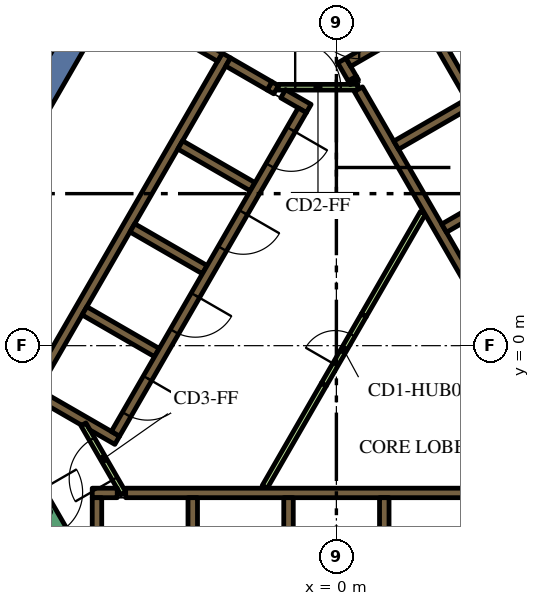
"""IFC4 building model, lengths in metres.
Left out: names, types, materials, properties, quantities, classifications, styles, units other than length and angle.
Written with IfcOpenShell. Run it as: python <this file> out.ifc"""

import sys

from ifc_helpers import new_model, si_unit, direction, frame, frame_2d, origin, place, context, subcontext, project, spatial, polyline, rectangle, outline, extrude, element, fill, save


model = new_model("IFC4")
c1 = context("Model", 3, precision=1e-05, world=origin(), true_north=direction((0.0, 1.0)))
c2 = subcontext(c1, "Body", "Model", "MODEL_VIEW")
j1 = project(units=[si_unit("LENGTHUNIT", "METRE"), si_unit("PLANEANGLEUNIT", "RADIAN")], contexts=[c1])
p1 = place(None, origin())
s1 = spatial("IfcSite", under=j1, at=p1, CompositionType="ELEMENT")
p2 = place(p1, origin())
s2 = spatial("IfcBuilding", under=s1, at=p2, CompositionType="ELEMENT")
p3 = place(p2, frame((0.0, 0.0, 239.4)))
s3 = spatial("IfcBuildingStorey", under=s2, at=p3, CompositionType="ELEMENT", Elevation=239.4)
p4 = place(p3, frame((8.235, 5.736, 0.0), z_axis=(0.0, 0.0, 1.0), x_axis=(-0.499983401189, 0.8660349869, 0.0)))
e1 = element("IfcWall", 1, at=p4, inside=s3, PredefinedType="SOLIDWALL", context=c2, shape_type="SweptSolid", body=[
    extrude(rectangle(XDim=12.472, YDim=0.7, at=frame_2d((6.236, 0.0))), origin(), (0.0, 0.0, 1.0), 4.2),
])
p5 = place(p3, frame((-12.625, -1.867, 0.0), z_axis=(0.0, 0.0, 1.0), x_axis=(0.500008520515, 0.866020484407, 0.0)))
e2 = element("IfcWall", 2, at=p5, inside=s3, PredefinedType="SOLIDWALL", context=c2, shape_type="SweptSolid", body=[
    extrude(rectangle(XDim=15.859, YDim=0.7, at=frame_2d((7.929, 0.0))), origin(), (0.0, 0.0, 1.0), 4.2),
])
p6 = place(p3, frame((-5.545, -3.875, 0.0), z_axis=(0.0, 0.0, 1.0), x_axis=(1.0, 0.0, 0.0)))
e3 = element("IfcWall", 3, at=p6, inside=s3, PredefinedType="SOLIDWALL", context=c2, shape_type="SweptSolid", body=[
    extrude(rectangle(XDim=11.97, YDim=0.25, at=frame_2d((5.985, 0.0))), origin(), (0.0, 0.0, 1.0), 4.2),
])
p7 = place(p3, frame((-6.425, -3.875, 0.0), z_axis=(0.0, 0.0, 1.0), x_axis=(1.0, 0.0, 0.0)))
e4 = element("IfcWall", 4, at=p7, inside=s3, PredefinedType="SOLIDWALL", context=c2, shape_type="SweptSolid", body=[
    extrude(rectangle(XDim=0.658, YDim=0.25, at=frame_2d((0.329, 0.0))), origin(), (0.0, 0.0, 1.0), 4.2),
])
for number, where, z_axis, x_axis in (
    (5, (1.26, -4.0, 0.0), (0.0, 0.0, 1.0), (0.0, -1.0, 0.0)),
    (6, (-1.26, -4.0, 0.0), (0.0, 0.0, 1.0), (0.0, -1.0, 0.0)),
    (7, (-3.78, -4.0, 0.0), (0.0, 0.0, 1.0), (0.0, -1.0, 0.0)),
):
    element("IfcWall", number, at=place(p3, frame(where, z_axis=z_axis, x_axis=x_axis)), inside=s3, PredefinedType="SOLIDWALL", context=c2, shape_type="SweptSolid", body=[
        extrude(rectangle(XDim=2.2, YDim=0.25, at=frame_2d((1.1, 0.0))), origin(), (0.0, 0.0, 1.0), 4.2),
    ])
p8 = place(p3, frame((-6.3, -7.125, 0.0), z_axis=(0.0, 0.0, 1.0), x_axis=(0.0, 1.0, 0.0)))
e8 = element("IfcWall", 8, at=p8, inside=s3, PredefinedType="SOLIDWALL", context=c2, shape_type="SweptSolid", body=[
    extrude(rectangle(XDim=3.125, YDim=0.25, at=frame_2d((1.562, 0.0))), origin(), (0.0, 0.0, 1.0), 4.2),
])
p9 = place(p3, frame((0.473, 6.93, 0.0), z_axis=(0.0, 0.0, 1.0), x_axis=(-0.49972245349, 0.866185586049, 0.0)))
e9 = element("IfcWall", 9, at=p9, inside=s3, PredefinedType="SOLIDWALL", context=c2, shape_type="SweptSolid", body=[
    extrude(rectangle(XDim=0.11, YDim=0.25, at=frame_2d((0.055, 0.0))), origin(), (0.0, 0.0, 1.0), 4.2),
])
p10 = place(p3, frame((6.568, -3.627, 0.0), z_axis=(0.0, 0.0, 1.0), x_axis=(-0.499999455981, 0.866025717874, 0.0)))
e10 = element("IfcWall", 10, at=p10, inside=s3, PredefinedType="SOLIDWALL", context=c2, shape_type="SweptSolid", body=[
    extrude(rectangle(XDim=11.978, YDim=0.25, at=frame_2d((5.989, 0.0))), origin(), (0.0, 0.0, 1.0), 4.2),
])
p11 = place(p3, frame((0.417, 7.027, 0.0), z_axis=(0.0, 0.0, 1.0), x_axis=(-0.500210807569, 0.865903659763, 0.0)))
e11 = element("IfcWall", 11, at=p11, inside=s3, PredefinedType="SOLIDWALL", context=c2, shape_type="SweptSolid", body=[
    extrude(rectangle(XDim=0.548, YDim=0.25, at=frame_2d((0.274, 0.0))), origin(), (0.0, 0.0, 1.0), 4.2),
])
p12 = place(p3, frame((3.1, 9.064, 0.0), z_axis=(0.0, 0.0, 1.0), x_axis=(-0.866030133475, -0.499991807846, 0.0)))
e12 = element("IfcWall", 12, at=p12, inside=s3, PredefinedType="SOLIDWALL", context=c2, shape_type="SweptSolid", body=[
    extrude(rectangle(XDim=3.217, YDim=0.25, at=frame_2d((1.608, 0.0))), origin(), (0.0, 0.0, 1.0), 4.2),
])
p13 = place(p3, frame((1.574, 5.274, 0.0), z_axis=(0.0, 0.0, 1.0), x_axis=(0.866028486751, 0.499994660107, 0.0)))
e13 = element("IfcWall", 13, at=p13, inside=s3, PredefinedType="SOLIDWALL", context=c2, shape_type="SweptSolid", body=[
    extrude(rectangle(XDim=2.2, YDim=0.25, at=frame_2d((1.1, 0.0))), origin(), (0.0, 0.0, 1.0), 4.2),
])
p14 = place(p3, frame((2.834, 3.091, 0.0), z_axis=(0.0, 0.0, 1.0), x_axis=(0.866008176907, 0.50002983664, 0.0)))
e14 = element("IfcWall", 14, at=p14, inside=s3, PredefinedType="SOLIDWALL", context=c2, shape_type="SweptSolid", body=[
    extrude(rectangle(XDim=2.2, YDim=0.25, at=frame_2d((1.1, 0.0))), origin(), (0.0, 0.0, 1.0), 4.2),
])
p15 = place(p3, frame((-8.06, -1.311, 0.0), z_axis=(0.0, 0.0, 1.0), x_axis=(0.50000273126, 0.866023826885, 0.0)))
e15 = element("IfcWall", 15, at=p15, inside=s3, PredefinedType="SOLIDWALL", context=c2, shape_type="SweptSolid", body=[
    extrude(rectangle(XDim=10.33, YDim=0.25, at=frame_2d((5.165, 0.0))), origin(), (0.0, 0.0, 1.0), 4.2),
])
p16 = place(p3, frame((-1.758, 6.835, 0.0), z_axis=(0.0, 0.0, 1.0), x_axis=(0.865982457891, -0.500074377092, 0.0)))
e16 = element("IfcWall", 16, at=p16, inside=s3, PredefinedType="SOLIDWALL", context=c2, shape_type="SweptSolid", body=[
    extrude(rectangle(XDim=0.2, YDim=0.25, at=frame_2d((0.1, 0.0))), origin(), (0.0, 0.0, 1.0), 4.2),
])
p17 = place(p3, frame((-1.76, 6.836, 0.0), z_axis=(0.0, 0.0, 1.0), x_axis=(-0.865952863304, 0.500125622755, 0.0)))
e17 = element("IfcWall", 17, at=p17, inside=s3, PredefinedType="SOLIDWALL", context=c2, shape_type="SweptSolid", body=[
    extrude(rectangle(XDim=1.258, YDim=0.25, at=frame_2d((0.629, 0.0))), origin(), (0.0, 0.0, 1.0), 4.2),
])
p18 = place(p3, frame((-0.728, 6.24, 0.0), z_axis=(0.0, 0.0, 1.0), x_axis=(-0.865955664968, 0.500120771724, 0.0)))
e18 = element("IfcWall", 18, at=p18, inside=s3, PredefinedType="SOLIDWALL", context=c2, shape_type="SweptSolid", body=[
    extrude(rectangle(XDim=0.778, YDim=0.25, at=frame_2d((0.389, 0.0))), origin(), (0.0, 0.0, 1.0), 4.2),
])
for number, where, z_axis, x_axis in (
    (19, (-2.204, 4.182, 0.0), (0.0, 0.0, 1.0), (-0.866, 0.5, 0.0)),
    (20, (-5.369, 3.1, 0.0), (0.0, 0.0, 1.0), (0.866, -0.5, 0.0)),
    (21, (-4.724, -0.182, 0.0), (0.0, 0.0, 1.0), (-0.866, 0.5, 0.0)),
):
    element("IfcWall", number, at=place(p3, frame(where, z_axis=z_axis, x_axis=x_axis)), inside=s3, PredefinedType="SOLIDWALL", context=c2, shape_type="SweptSolid", body=[
        extrude(rectangle(XDim=2.2, YDim=0.25, at=frame_2d((1.1, 0.0))), origin(), (0.0, 0.0, 1.0), 4.2),
    ])
p19 = place(p3, origin())
e22 = element("IfcWall", 22, at=p19, inside=s3, PredefinedType="SOLIDWALL", context=c2, shape_type="SweptSolid", body=[
    extrude(outline(polyline([(-5.922, -2.257), (-5.922, -2.257), (-5.705, -2.382), (-5.83, -2.598), (-6.483, -2.221), (-6.591, -2.033), (-6.591, -2.033), (-6.7, -2.096), (-7.952, -1.373), (-7.827, -1.156), (-5.922, -2.257)])), origin(), (0.0, 0.0, 1.0), 4.2),
])
p20 = place(p3, frame((-3.066, 7.59, 0.0), z_axis=(0.0, 0.0, 1.0), x_axis=(-0.866081358704, 0.49990307071, 0.0)))
e23 = element("IfcWall", 23, at=p20, inside=s3, PredefinedType="SOLIDWALL", context=c2, shape_type="SweptSolid", body=[
    extrude(rectangle(XDim=0.858, YDim=0.25, at=frame_2d((0.429, 0.0))), origin(), (0.0, 0.0, 1.0), 4.2),
])
p21 = place(p3, frame((-1.887, -3.718, 0.0), z_axis=(0.0, 0.0, 1.0), x_axis=(0.500043732237, 0.866000153493, 0.0)))
e24 = element("IfcWall", 24, at=p21, inside=s3, PredefinedType="PARTITIONING", context=c2, shape_type="SweptSolid", body=[
    extrude(rectangle(XDim=3.114, YDim=0.15, at=frame_2d((1.557, 0.0))), origin(), (0.0, 0.0, 1.0), 3.45),
])
p22 = place(p3, frame((0.72, 0.797, 0.0), z_axis=(0.0, 0.0, 1.0), x_axis=(0.499984921984, 0.866034108906, 0.0)))
e25 = element("IfcWall", 25, at=p22, inside=s3, PredefinedType="PARTITIONING", context=c2, shape_type="SweptSolid", body=[
    extrude(rectangle(XDim=3.113, YDim=0.15, at=frame_2d((1.557, 0.0))), origin(), (0.0, 0.0, 1.0), 3.45),
])
p23 = place(p3, frame((8.565, -2.185, 0.0), z_axis=(0.0, 0.0, 1.0), x_axis=(-0.499997954832, 0.866026584559, 0.0)))
e26 = element("IfcWall", 26, at=p23, inside=s3, PredefinedType="SOLIDWALL", context=c2, shape_type="SweptSolid", body=[
    extrude(rectangle(XDim=12.35, YDim=0.25, at=frame_2d((6.175, 0.0))), origin(), (0.0, 0.0, 1.0), 4.2),
])
p24 = place(p23, frame((0.585, 0.0, 0.0)))
e27 = element("IfcOpeningElement", 27, at=p24, cuts=e26, PredefinedType="OPENING", context=c2, shape_type="SweptSolid", body=[
    extrude(rectangle(XDim=1.1, YDim=2.1, at=frame_2d((0.55, 1.05))), frame((0.0, 0.135, 0.0), z_axis=(0.0, -1.0, 0.0), x_axis=(1.0, 0.0, 0.0)), (0.0, 0.0, 1.0), 0.27),
])
p25 = place(p3, frame((-0.898, 6.194, 0.0), z_axis=(0.0, 0.0, 1.0), x_axis=(-0.499996202215, -0.866027596426, 0.0)))
e28 = element("IfcWall", 28, at=p25, inside=s3, PredefinedType="SOLIDWALL", context=c2, shape_type="SweptSolid", body=[
    extrude(rectangle(XDim=9.83, YDim=0.25, at=frame_2d((4.915, 0.0))), origin(), (0.0, 0.0, 1.0), 4.2),
])
p26 = place(p25, frame((0.585, 0.0, 0.0)))
e29 = element("IfcOpeningElement", 29, at=p26, cuts=e28, PredefinedType="OPENING", context=c2, shape_type="SweptSolid", body=[
    extrude(rectangle(XDim=1.1, YDim=2.1, at=frame_2d((0.55, 1.05))), frame((0.0, 0.135, 0.0), z_axis=(0.0, -1.0, 0.0), x_axis=(1.0, 0.0, 0.0)), (0.0, 0.0, 1.0), 0.27),
])
p27 = place(p25, frame((3.105, 0.0, 0.0)))
e30 = element("IfcOpeningElement", 30, at=p27, cuts=e28, PredefinedType="OPENING", context=c2, shape_type="SweptSolid", body=[
    extrude(rectangle(XDim=1.1, YDim=2.1, at=frame_2d((0.55, 1.05))), frame((0.0, 0.135, 0.0), z_axis=(0.0, -1.0, 0.0), x_axis=(1.0, 0.0, 0.0)), (0.0, 0.0, 1.0), 0.27),
])
p28 = place(p25, frame((5.625, 0.0, 0.0)))
e31 = element("IfcOpeningElement", 31, at=p28, cuts=e28, PredefinedType="OPENING", context=c2, shape_type="SweptSolid", body=[
    extrude(rectangle(XDim=1.1, YDim=2.1, at=frame_2d((0.55, 1.05))), frame((0.0, 0.135, 0.0), z_axis=(0.0, -1.0, 0.0), x_axis=(1.0, 0.0, 0.0)), (0.0, 0.0, 1.0), 0.27),
])
p29 = place(p25, frame((8.145, 0.0, 0.0)))
e32 = element("IfcOpeningElement", 32, at=p29, cuts=e28, PredefinedType="OPENING", context=c2, shape_type="SweptSolid", body=[
    extrude(rectangle(XDim=1.1, YDim=2.1, at=frame_2d((0.55, 1.05))), frame((0.0, 0.135, 0.0), z_axis=(0.0, -1.0, 0.0), x_axis=(1.0, 0.0, 0.0)), (0.0, 0.0, 1.0), 0.27),
])
p30 = place(p3, frame((-8.103, -3.466, 0.0), z_axis=(0.0, 0.0, 1.0), x_axis=(0.500078061341, -0.865980330357, 0.0)))
e33 = element("IfcWall", 33, at=p30, inside=s3, PredefinedType="SOLIDWALL", context=c2, shape_type="SweptSolid", body=[
    extrude(rectangle(XDim=2.1, YDim=0.4, at=frame_2d((1.05, 0.0))), origin(), (0.0, 0.0, 1.0), 4.2),
])
p31 = place(p30, frame((0.45, 0.0, 0.0)))
e34 = element("IfcOpeningElement", 34, at=p31, cuts=e33, PredefinedType="OPENING", context=c2, shape_type="SweptSolid", body=[
    extrude(rectangle(XDim=1.2, YDim=2.1, at=frame_2d((0.6, 1.05))), frame((0.0, 0.21, 0.0), z_axis=(0.0, -1.0, 0.0), x_axis=(1.0, 0.0, 0.0)), (0.0, 0.0, 1.0), 0.42),
])
p32 = place(p3, frame((-0.33, -1.022, 0.0), z_axis=(0.0, 0.0, 1.0), x_axis=(0.500027713859, 0.866009402589, 0.0)))
e35 = element("IfcWall", 35, at=p32, inside=s3, PredefinedType="PARTITIONING", context=c2, shape_type="SweptSolid", body=[
    extrude(rectangle(XDim=2.1, YDim=0.15, at=frame_2d((1.05, 0.0))), origin(), (0.0, 0.0, 1.0), 3.45),
])
p33 = place(p32, frame((0.6, 0.0, 0.0)))
e36 = element("IfcOpeningElement", 36, at=p33, cuts=e35, PredefinedType="OPENING", context=c2, shape_type="SweptSolid", body=[
    extrude(rectangle(XDim=0.9, YDim=2.1, at=frame_2d((0.45, 1.05))), frame((0.0, 0.085, 0.0), z_axis=(0.0, -1.0, 0.0), x_axis=(1.0, 0.0, 0.0)), (0.0, 0.0, 1.0), 0.17),
])
p34 = place(p3, frame((-1.534, 6.8, 0.0), z_axis=(0.0, 0.0, 1.0), x_axis=(1.0, 0.0, 0.0)))
e37 = element("IfcWall", 37, at=p34, inside=s3, PredefinedType="PARTITIONING", context=c2, shape_type="SweptSolid", body=[
    extrude(rectangle(XDim=2.1, YDim=0.15, at=frame_2d((1.05, 0.0))), origin(), (0.0, 0.0, 1.0), 3.45),
])
p35 = place(p34, frame((0.45, 0.0, 0.0)))
e38 = element("IfcOpeningElement", 38, at=p35, cuts=e37, PredefinedType="OPENING", context=c2, shape_type="SweptSolid", body=[
    extrude(rectangle(XDim=1.2, YDim=2.1, at=frame_2d((0.6, 1.05))), frame((0.0, 0.085, 0.0), z_axis=(0.0, -1.0, 0.0), x_axis=(1.0, 0.0, 0.0)), (0.0, 0.0, 1.0), 0.17),
])
p36 = place(p3, frame((-5.606, -3.89, 0.0), z_axis=(0.0, 0.0, 1.0), x_axis=(-0.500027713859, 0.866009402589, 0.0)))
e39 = element("IfcWall", 39, at=p36, inside=s3, PredefinedType="PARTITIONING", context=c2, shape_type="SweptSolid", body=[
    extrude(rectangle(XDim=2.1, YDim=0.15, at=frame_2d((1.05, 0.0))), origin(), (0.0, 0.0, 1.0), 3.45),
])
p37 = place(p36, frame((0.45, 0.0, 0.0)))
e40 = element("IfcOpeningElement", 40, at=p37, cuts=e39, PredefinedType="OPENING", context=c2, shape_type="SweptSolid", body=[
    extrude(rectangle(XDim=1.2, YDim=2.1, at=frame_2d((0.6, 1.05))), frame((0.0, 0.085, 0.0), z_axis=(0.0, -1.0, 0.0), x_axis=(1.0, 0.0, 0.0)), (0.0, 0.0, 1.0), 0.17),
])
p38 = place(p3, frame((-7.364, 11.545, 0.0), z_axis=(0.0, 0.0, 1.0), x_axis=(-0.500001759768, -0.86602438778, 0.0)))
e41 = element("IfcWall", 41, at=p38, inside=s3, PredefinedType="PARTITIONING", context=c2, shape_type="SweptSolid", body=[
    extrude(rectangle(XDim=13.317, YDim=0.2, at=frame_2d((6.658, 0.0))), origin(), (0.0, 0.0, 1.0), 3.45),
])
p39 = place(p38, frame((6.2, 0.0, 0.0)))
e42 = element("IfcOpeningElement", 42, at=p39, cuts=e41, PredefinedType="OPENING", context=c2, shape_type="SweptSolid", body=[
    extrude(rectangle(XDim=1.0, YDim=2.1, at=frame_2d((0.5, 1.05))), frame((0.0, 0.11, 0.0), z_axis=(0.0, -1.0, 0.0), x_axis=(1.0, 0.0, 0.0)), (0.0, 0.0, 1.0), 0.22),
])
p40 = place(p26, origin())
e43 = element("IfcDoor", 43, at=p40, inside=s3, OperationType="DOUBLE_DOOR_SLIDING", PredefinedType="DOOR", context=c2, shape_type="SweptSolid", body=[
    extrude(rectangle(XDim=1.1, YDim=2.1, at=frame_2d((0.55, 1.05))), frame((0.0, 0.025, 0.0), z_axis=(0.0, -1.0, 0.0), x_axis=(1.0, 0.0, 0.0)), (0.0, 0.0, 1.0), 0.05),
])
fill(e29, e43)
p41 = place(p27, origin())
e44 = element("IfcDoor", 44, at=p41, inside=s3, OperationType="DOUBLE_DOOR_SLIDING", PredefinedType="DOOR", context=c2, shape_type="SweptSolid", body=[
    extrude(rectangle(XDim=1.1, YDim=2.1, at=frame_2d((0.55, 1.05))), frame((0.0, 0.025, 0.0), z_axis=(0.0, -1.0, 0.0), x_axis=(1.0, 0.0, 0.0)), (0.0, 0.0, 1.0), 0.05),
])
fill(e30, e44)
p42 = place(p28, origin())
e45 = element("IfcDoor", 45, at=p42, inside=s3, OperationType="DOUBLE_DOOR_SLIDING", PredefinedType="DOOR", context=c2, shape_type="SweptSolid", body=[
    extrude(rectangle(XDim=1.1, YDim=2.1, at=frame_2d((0.55, 1.05))), frame((0.0, 0.025, 0.0), z_axis=(0.0, -1.0, 0.0), x_axis=(1.0, 0.0, 0.0)), (0.0, 0.0, 1.0), 0.05),
])
fill(e31, e45)
p43 = place(p29, origin())
e46 = element("IfcDoor", 46, at=p43, inside=s3, OperationType="DOUBLE_DOOR_SLIDING", PredefinedType="DOOR", context=c2, shape_type="SweptSolid", body=[
    extrude(rectangle(XDim=1.1, YDim=2.1, at=frame_2d((0.55, 1.05))), frame((0.0, 0.025, 0.0), z_axis=(0.0, -1.0, 0.0), x_axis=(1.0, 0.0, 0.0)), (0.0, 0.0, 1.0), 0.05),
])
fill(e32, e46)
p44 = place(p31, origin())
e47 = element("IfcDoor", 47, at=p44, inside=s3, OperationType="SINGLE_SWING_LEFT", PredefinedType="DOOR", context=c2, shape_type="SweptSolid", body=[
    extrude(rectangle(XDim=1.2, YDim=2.1, at=frame_2d((0.6, 1.05))), frame((0.0, 0.025, 0.0), z_axis=(0.0, -1.0, 0.0), x_axis=(1.0, 0.0, 0.0)), (0.0, 0.0, 1.0), 0.05),
])
fill(e34, e47)
p45 = place(p33, origin())
e48 = element("IfcDoor", 48, at=p45, inside=s3, OperationType="SINGLE_SWING_LEFT", PredefinedType="DOOR", context=c2, shape_type="SweptSolid", body=[
    extrude(rectangle(XDim=0.9, YDim=2.1, at=frame_2d((0.45, 1.05))), frame((0.0, 0.025, 0.0), z_axis=(0.0, -1.0, 0.0), x_axis=(1.0, 0.0, 0.0)), (0.0, 0.0, 1.0), 0.05),
])
fill(e36, e48)
p46 = place(p35, origin())
e49 = element("IfcDoor", 49, at=p46, inside=s3, OperationType="SINGLE_SWING_LEFT", PredefinedType="DOOR", context=c2, shape_type="SweptSolid", body=[
    extrude(rectangle(XDim=1.2, YDim=2.1, at=frame_2d((0.6, 1.05))), frame((0.0, 0.025, 0.0), z_axis=(0.0, -1.0, 0.0), x_axis=(1.0, 0.0, 0.0)), (0.0, 0.0, 1.0), 0.05),
])
fill(e38, e49)
p47 = place(p37, origin())
e50 = element("IfcDoor", 50, at=p47, inside=s3, OperationType="SINGLE_SWING_LEFT", PredefinedType="DOOR", context=c2, shape_type="SweptSolid", body=[
    extrude(rectangle(XDim=1.2, YDim=2.1, at=frame_2d((0.6, 1.05))), frame((0.0, 0.025, 0.0), z_axis=(0.0, -1.0, 0.0), x_axis=(1.0, 0.0, 0.0)), (0.0, 0.0, 1.0), 0.05),
])
fill(e40, e50)
save(model, sys.argv[1])
